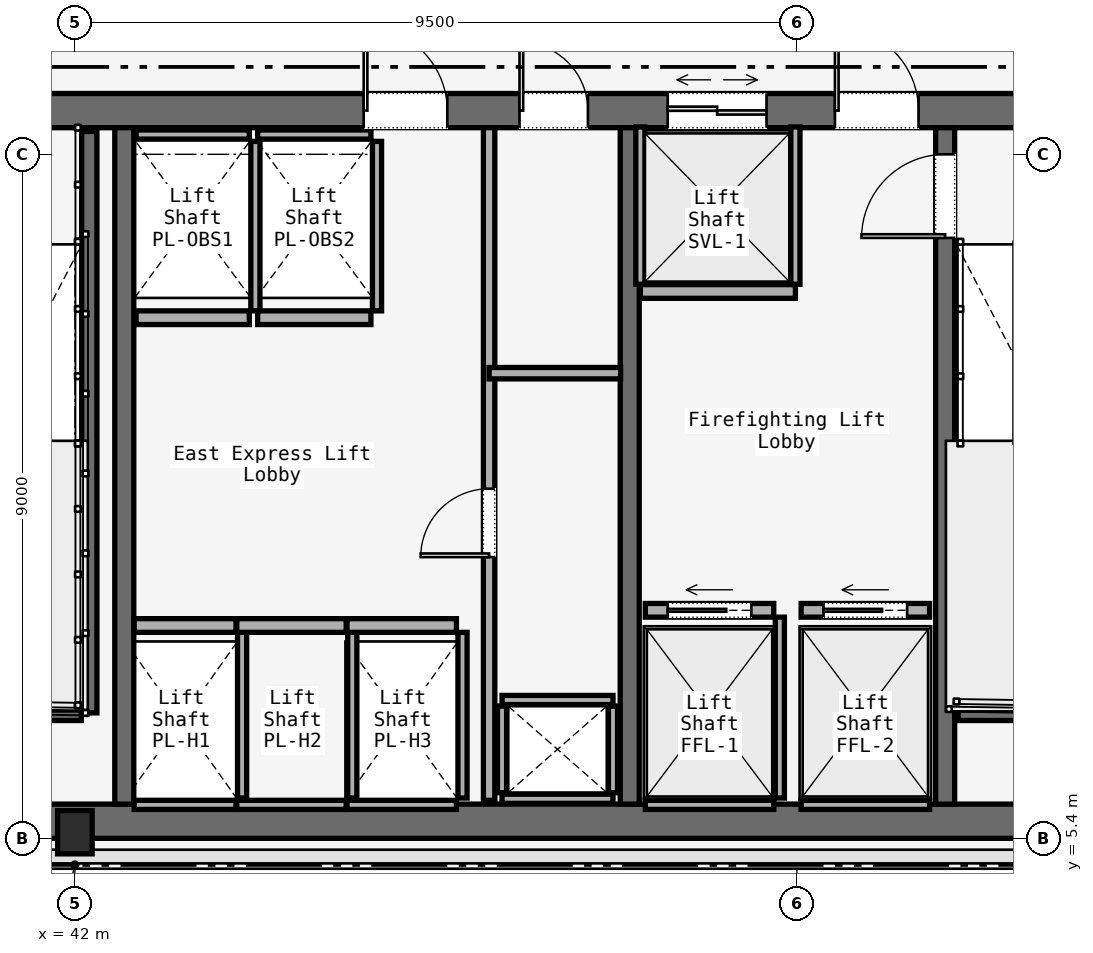
"""IFC4 building model, lengths in metres.
Left out: names, types, materials, properties, quantities, classifications, styles, units other than length and angle.
Written with IfcOpenShell. Run it as: python <this file> out.ifc"""

import sys

from ifc_helpers import new_model, si_unit, direction, frame, frame_2d, origin, origin_2d, place, context, subcontext, project, spatial, rectangle, i_section, extrude, element, fill, save


model = new_model("IFC4")
c1 = context("Model", 3, precision=1e-05, world=origin(), true_north=direction((0.0, 1.0)))
c2 = subcontext(c1, "Body", "Model", "MODEL_VIEW")
j1 = project(units=[si_unit("LENGTHUNIT", "METRE"), si_unit("PLANEANGLEUNIT", "RADIAN")], contexts=[c1])
p1 = place(None, origin())
s1 = spatial("IfcSite", under=j1, at=p1, CompositionType="ELEMENT")
p2 = place(p1, origin())
s2 = spatial("IfcBuilding", under=s1, at=p2, CompositionType="ELEMENT")
p3 = place(p2, frame((0.0, 0.0, 58.8)))
s3 = spatial("IfcBuildingStorey", under=s2, at=p3, CompositionType="ELEMENT", Elevation=58.8)
p4 = place(p3, frame((26.45, 14.975, 0.0), z_axis=(0.0, 0.0, 1.0), x_axis=(1.0, 0.0, 0.0)))
e1 = element("IfcWall", 1, at=p4, inside=s3, PredefinedType="SOLIDWALL", context=c2, shape_type="SweptSolid", body=[
    extrude(rectangle(XDim=31.1, YDim=0.45, at=frame_2d((15.55, 0.0))), origin(), (0.0, 0.0, 1.0), 3.58),
])
p5 = place(p4, frame((1.65, 0.0, 0.0)))
e2 = element("IfcOpeningElement", 2, at=p5, cuts=e1, PredefinedType="OPENING", context=c2, shape_type="SweptSolid", body=[
    extrude(rectangle(XDim=1.1, YDim=2.2, at=frame_2d((0.55, 1.1))), frame((0.0, 0.225, 0.0), z_axis=(0.0, -1.0, 0.0), x_axis=(1.0, 0.0, 0.0)), (0.0, 0.0, 1.0), 0.45),
])
p6 = place(p4, frame((13.65, 0.0, 0.0)))
e3 = element("IfcOpeningElement", 3, at=p6, cuts=e1, PredefinedType="OPENING", context=c2, shape_type="SweptSolid", body=[
    extrude(rectangle(XDim=1.1, YDim=2.2, at=frame_2d((0.55, 1.1))), frame((0.0, 0.225, 0.0), z_axis=(0.0, -1.0, 0.0), x_axis=(1.0, 0.0, 0.0)), (0.0, 0.0, 1.0), 0.45),
])
p7 = place(p4, frame((25.55, 0.0, 0.0)))
e4 = element("IfcOpeningElement", 4, at=p7, cuts=e1, PredefinedType="OPENING", context=c2, shape_type="SweptSolid", body=[
    extrude(rectangle(XDim=1.1, YDim=2.2, at=frame_2d((0.55, 1.1))), frame((0.0, 0.225, 0.0), z_axis=(0.0, -1.0, 0.0), x_axis=(1.0, 0.0, 0.0)), (0.0, 0.0, 1.0), 0.45),
])
p8 = place(p4, frame((10.7, 0.0, 0.0)))
e5 = element("IfcOpeningElement", 5, at=p8, cuts=e1, PredefinedType="OPENING", context=c2, shape_type="SweptSolid", body=[
    extrude(rectangle(XDim=1.4, YDim=2.2, at=frame_2d((0.7, 1.1))), frame((0.0, 0.225, 0.0), z_axis=(0.0, -1.0, 0.0), x_axis=(1.0, 0.0, 0.0)), (0.0, 0.0, 1.0), 0.45),
])
p9 = place(p4, frame((19.35, 0.0, 0.0)))
e6 = element("IfcOpeningElement", 6, at=p9, cuts=e1, PredefinedType="OPENING", context=c2, shape_type="SweptSolid", body=[
    extrude(rectangle(XDim=1.1, YDim=2.2, at=frame_2d((0.55, 1.1))), frame((0.0, 0.225, 0.0), z_axis=(0.0, -1.0, 0.0), x_axis=(1.0, 0.0, 0.0)), (0.0, 0.0, 1.0), 0.45),
])
p10 = place(p4, frame((21.4, 0.0, 0.0)))
e7 = element("IfcOpeningElement", 7, at=p10, cuts=e1, PredefinedType="OPENING", context=c2, shape_type="SweptSolid", body=[
    extrude(rectangle(XDim=0.9, YDim=2.1, at=frame_2d((0.45, 1.05))), frame((0.0, 0.225, 0.0), z_axis=(0.0, -1.0, 0.0), x_axis=(1.0, 0.0, 0.0)), (0.0, 0.0, 1.0), 0.45),
])
p11 = place(p4, frame((23.35, 0.0, 0.0)))
e8 = element("IfcOpeningElement", 8, at=p11, cuts=e1, PredefinedType="OPENING", context=c2, shape_type="SweptSolid", body=[
    extrude(rectangle(XDim=1.3, YDim=2.3, at=frame_2d((0.65, 1.15))), frame((0.0, 0.225, 0.0), z_axis=(0.0, -1.0, 0.0), x_axis=(1.0, 0.0, 0.0)), (0.0, 0.0, 1.0), 0.45),
])
p12 = place(p3, frame((26.45, 5.625, 0.0), z_axis=(0.0, 0.0, 1.0), x_axis=(1.0, 0.0, 0.0)))
e9 = element("IfcWall", 9, at=p12, inside=s3, PredefinedType="SOLIDWALL", context=c2, shape_type="SweptSolid", body=[
    extrude(rectangle(XDim=31.1, YDim=0.45, at=frame_2d((15.55, 0.0))), origin(), (0.0, 0.0, 1.0), 3.58),
])
for number, where, z_axis, x_axis in (
    (10, (42.65, 5.85, 0.0), (0.0, 0.0, 1.0), (0.0, 1.0, 0.0)),
    (11, (49.3, 5.85, 0.0), (0.0, 0.0, 1.0), (0.0, 1.0, 0.0)),
):
    element("IfcWall", number, at=place(p3, frame(where, z_axis=z_axis, x_axis=x_axis)), inside=s3, PredefinedType="SOLIDWALL", context=c2, shape_type="SweptSolid", body=[
        extrude(rectangle(XDim=8.9, YDim=0.25, at=frame_2d((4.45, 0.0))), origin(), (0.0, 0.0, 1.0), 3.58),
    ])
p13 = place(p3, frame((53.45, 5.85, 0.0), z_axis=(0.0, 0.0, 1.0), x_axis=(0.0, 1.0, 0.0)))
e12 = element("IfcWall", 12, at=p13, inside=s3, PredefinedType="SOLIDWALL", context=c2, shape_type="SweptSolid", body=[
    extrude(rectangle(XDim=8.9, YDim=0.25, at=frame_2d((4.45, 0.0))), origin(), (0.0, 0.0, 1.0), 3.58),
])
p14 = place(p13, frame((7.45, 0.0, 0.0)))
e13 = element("IfcOpeningElement", 13, at=p14, cuts=e12, PredefinedType="OPENING", context=c2, shape_type="SweptSolid", body=[
    extrude(rectangle(XDim=1.1, YDim=2.2, at=frame_2d((0.55, 1.1))), frame((0.0, 0.125, 0.0), z_axis=(0.0, -1.0, 0.0), x_axis=(1.0, 0.0, 0.0)), (0.0, 0.0, 1.0), 0.25),
])
p15 = place(p3, frame((42.0, 5.48, 0.0), z_axis=(0.0, 0.0, 1.0), x_axis=(1.0, 0.0, 0.0)))
e14 = element("IfcColumn", 14, at=p15, inside=s3, PredefinedType="COLUMN", context=c2, shape_type="SweptSolid", body=[
    extrude(i_section(OverallWidth=0.454, OverallDepth=0.569, WebThickness=0.078, FlangeThickness=0.08, FilletRadius=0.015, at=origin_2d()), origin(), (0.0, 0.0, 1.0), 3.58),
])
p16 = place(p3, frame((42.19, 14.7, 0.0), z_axis=(0.0, 0.0, 1.0), x_axis=(0.0, -1.0, 0.0)))
e15 = element("IfcWall", 15, at=p16, inside=s3, PredefinedType="SOLIDWALL", context=c2, shape_type="SweptSolid", body=[
    extrude(rectangle(XDim=7.65, YDim=0.2, at=frame_2d((3.825, 0.0))), origin(), (0.0, 0.0, 1.0), 3.8),
])
for number, where, z_axis, x_axis in (
    (16, (38.97, 7.05, 0.0), (0.0, 0.0, 1.0), (1.0, 0.0, 0.0)),
    (17, (53.62, 7.05, 0.0), (0.0, 0.0, 1.0), (1.0, 0.0, 0.0)),
):
    element("IfcWall", number, at=place(p3, frame(where, z_axis=z_axis, x_axis=x_axis)), inside=s3, PredefinedType="SOLIDWALL", context=c2, shape_type="SweptSolid", body=[
        extrude(rectangle(XDim=3.115, YDim=0.2, at=frame_2d((1.558, 0.0))), origin(), (0.0, 0.0, 1.0), 3.8),
    ])
for number, where, z_axis, x_axis in (
    (18, (47.62, 5.92, 0.0), (0.0, 0.0, 1.0), (1.0, 0.0, 0.0)),
    (19, (47.62, 7.22, 0.0), (0.0, 0.0, 1.0), (1.0, 0.0, 0.0)),
):
    element("IfcWall", number, at=place(p3, frame(where, z_axis=z_axis, x_axis=x_axis)), inside=s3, PredefinedType="SOLIDWALL", context=c2, shape_type="SweptSolid", body=[
        extrude(rectangle(XDim=1.46, YDim=0.12, at=frame_2d((0.73, 0.0))), origin(), (0.0, 0.0, 1.0), 2.933),
    ])
for number, where, z_axis, x_axis in (
    (20, (47.62, 6.0, 0.0), (0.0, 0.0, 1.0), (0.0, 1.0, 0.0)),
    (21, (49.08, 6.0, 0.0), (0.0, 0.0, 1.0), (0.0, 1.0, 0.0)),
):
    element("IfcWall", number, at=place(p3, frame(where, z_axis=z_axis, x_axis=x_axis)), inside=s3, PredefinedType="SOLIDWALL", context=c2, shape_type="SweptSolid", body=[
        extrude(rectangle(XDim=1.14, YDim=0.12, at=frame_2d((0.57, 0.0))), origin(), (0.0, 0.0, 1.0), 2.933),
    ])
p17 = place(p3, frame((47.45, 5.9, 0.0), z_axis=(0.0, 0.0, 1.0), x_axis=(0.0, 1.0, 0.0)))
e22 = element("IfcWall", 22, at=p17, inside=s3, PredefinedType="PARTITIONING", context=c2, shape_type="SweptSolid", body=[
    extrude(rectangle(XDim=8.85, YDim=0.15, at=frame_2d((4.425, 0.0))), origin(), (0.0, 0.0, 1.0), 2.933),
])
p18 = place(p17, frame((3.2, 0.0, 0.0)))
e23 = element("IfcOpeningElement", 23, at=p18, cuts=e22, PredefinedType="OPENING", context=c2, shape_type="SweptSolid", body=[
    extrude(rectangle(XDim=0.9, YDim=2.1, at=frame_2d((0.45, 1.05))), frame((0.0, 0.075, 0.0), z_axis=(0.0, -1.0, 0.0), x_axis=(1.0, 0.0, 0.0)), (0.0, 0.0, 1.0), 0.15),
])
p19 = place(p3, frame((47.45, 11.52, 0.0), z_axis=(0.0, 0.0, 1.0), x_axis=(1.0, 0.0, 0.0)))
e24 = element("IfcWall", 24, at=p19, inside=s3, PredefinedType="PARTITIONING", context=c2, shape_type="SweptSolid", body=[
    extrude(rectangle(XDim=1.73, YDim=0.15, at=frame_2d((0.865, 0.0))), origin(), (0.0, 0.0, 1.0), 2.933),
])
p20 = place(p3, frame((42.78, 8.2, 0.0), z_axis=(0.0, 0.0, 1.0), x_axis=(1.0, 0.0, 0.0)))
e25 = element("IfcWall", 25, at=p20, inside=s3, PredefinedType="SOLIDWALL", context=c2, shape_type="SweptSolid", body=[
    extrude(rectangle(XDim=1.34, YDim=0.18, at=frame_2d((0.67, 0.0))), origin(), (0.0, 0.0, 1.0), 2.933),
])
p21 = place(p3, frame((42.78, 5.84, 0.0), z_axis=(0.0, 0.0, 1.0), x_axis=(1.0, 0.0, 0.0)))
e26 = element("IfcWall", 26, at=p21, inside=s3, PredefinedType="SOLIDWALL", context=c2, shape_type="SweptSolid", body=[
    extrude(rectangle(XDim=1.34, YDim=0.12, at=frame_2d((0.67, 0.0))), origin(), (0.0, 0.0, 1.0), 2.933),
])
p22 = place(p3, frame((44.2, 5.93, 0.0), z_axis=(0.0, 0.0, 1.0), x_axis=(0.0, 1.0, 0.0)))
e27 = element("IfcWall", 27, at=p22, inside=s3, PredefinedType="SOLIDWALL", context=c2, shape_type="SweptSolid", body=[
    extrude(rectangle(XDim=2.18, YDim=0.12, at=frame_2d((1.09, 0.0))), origin(), (0.0, 0.0, 1.0), 2.933),
])
p23 = place(p3, frame((44.13, 8.2, 0.0), z_axis=(0.0, 0.0, 1.0), x_axis=(1.0, 0.0, 0.0)))
e28 = element("IfcWall", 28, at=p23, inside=s3, PredefinedType="SOLIDWALL", context=c2, shape_type="SweptSolid", body=[
    extrude(rectangle(XDim=1.44, YDim=0.18, at=frame_2d((0.72, 0.0))), origin(), (0.0, 0.0, 1.0), 2.933),
])
p24 = place(p3, frame((44.13, 5.84, 0.0), z_axis=(0.0, 0.0, 1.0), x_axis=(1.0, 0.0, 0.0)))
e29 = element("IfcWall", 29, at=p24, inside=s3, PredefinedType="SOLIDWALL", context=c2, shape_type="SweptSolid", body=[
    extrude(rectangle(XDim=1.44, YDim=0.12, at=frame_2d((0.72, 0.0))), origin(), (0.0, 0.0, 1.0), 2.933),
])
p25 = place(p3, frame((45.65, 5.93, 0.0), z_axis=(0.0, 0.0, 1.0), x_axis=(0.0, 1.0, 0.0)))
e30 = element("IfcWall", 30, at=p25, inside=s3, PredefinedType="SOLIDWALL", context=c2, shape_type="SweptSolid", body=[
    extrude(rectangle(XDim=2.18, YDim=0.12, at=frame_2d((1.09, 0.0))), origin(), (0.0, 0.0, 1.0), 2.933),
])
p26 = place(p3, frame((45.58, 8.2, 0.0), z_axis=(0.0, 0.0, 1.0), x_axis=(1.0, 0.0, 0.0)))
e31 = element("IfcWall", 31, at=p26, inside=s3, PredefinedType="SOLIDWALL", context=c2, shape_type="SweptSolid", body=[
    extrude(rectangle(XDim=1.44, YDim=0.18, at=frame_2d((0.72, 0.0))), origin(), (0.0, 0.0, 1.0), 2.933),
])
p27 = place(p3, frame((45.58, 5.84, 0.0), z_axis=(0.0, 0.0, 1.0), x_axis=(1.0, 0.0, 0.0)))
e32 = element("IfcWall", 32, at=p27, inside=s3, PredefinedType="SOLIDWALL", context=c2, shape_type="SweptSolid", body=[
    extrude(rectangle(XDim=1.44, YDim=0.12, at=frame_2d((0.72, 0.0))), origin(), (0.0, 0.0, 1.0), 2.933),
])
p28 = place(p3, frame((47.1, 5.93, 0.0), z_axis=(0.0, 0.0, 1.0), x_axis=(0.0, 1.0, 0.0)))
e33 = element("IfcWall", 33, at=p28, inside=s3, PredefinedType="SOLIDWALL", context=c2, shape_type="SweptSolid", body=[
    extrude(rectangle(XDim=2.18, YDim=0.12, at=frame_2d((1.09, 0.0))), origin(), (0.0, 0.0, 1.0), 2.933),
])
p29 = place(p3, frame((42.805, 12.25, 0.0), z_axis=(0.0, 0.0, 1.0), x_axis=(1.0, 0.0, 0.0)))
e34 = element("IfcWall", 34, at=p29, inside=s3, PredefinedType="SOLIDWALL", context=c2, shape_type="SweptSolid", body=[
    extrude(rectangle(XDim=1.49, YDim=0.18, at=frame_2d((0.745, 0.0))), origin(), (0.0, 0.0, 1.0), 2.933),
])
p30 = place(p3, frame((42.805, 14.66, 0.0), z_axis=(0.0, 0.0, 1.0), x_axis=(1.0, 0.0, 0.0)))
e35 = element("IfcWall", 35, at=p30, inside=s3, PredefinedType="SOLIDWALL", context=c2, shape_type="SweptSolid", body=[
    extrude(rectangle(XDim=1.49, YDim=0.12, at=frame_2d((0.745, 0.0))), origin(), (0.0, 0.0, 1.0), 2.933),
])
p31 = place(p3, frame((44.375, 12.34, 0.0), z_axis=(0.0, 0.0, 1.0), x_axis=(0.0, 1.0, 0.0)))
e36 = element("IfcWall", 36, at=p31, inside=s3, PredefinedType="SOLIDWALL", context=c2, shape_type="SweptSolid", body=[
    extrude(rectangle(XDim=2.23, YDim=0.12, at=frame_2d((1.115, 0.0))), origin(), (0.0, 0.0, 1.0), 2.933),
])
p32 = place(p3, frame((44.405, 12.25, 0.0), z_axis=(0.0, 0.0, 1.0), x_axis=(1.0, 0.0, 0.0)))
e37 = element("IfcWall", 37, at=p32, inside=s3, PredefinedType="SOLIDWALL", context=c2, shape_type="SweptSolid", body=[
    extrude(rectangle(XDim=1.49, YDim=0.18, at=frame_2d((0.745, 0.0))), origin(), (0.0, 0.0, 1.0), 2.933),
])
p33 = place(p3, frame((44.405, 14.66, 0.0), z_axis=(0.0, 0.0, 1.0), x_axis=(1.0, 0.0, 0.0)))
e38 = element("IfcWall", 38, at=p33, inside=s3, PredefinedType="SOLIDWALL", context=c2, shape_type="SweptSolid", body=[
    extrude(rectangle(XDim=1.49, YDim=0.12, at=frame_2d((0.745, 0.0))), origin(), (0.0, 0.0, 1.0), 2.933),
])
p34 = place(p3, frame((45.975, 12.34, 0.0), z_axis=(0.0, 0.0, 1.0), x_axis=(0.0, 1.0, 0.0)))
e39 = element("IfcWall", 39, at=p34, inside=s3, PredefinedType="SOLIDWALL", context=c2, shape_type="SweptSolid", body=[
    extrude(rectangle(XDim=2.23, YDim=0.12, at=frame_2d((1.115, 0.0))), origin(), (0.0, 0.0, 1.0), 2.933),
])
p35 = place(p3, frame((49.505, 8.4, 0.0), z_axis=(0.0, 0.0, 1.0), x_axis=(1.0, 0.0, 0.0)))
e40 = element("IfcWall", 40, at=p35, inside=s3, PredefinedType="SOLIDWALL", context=c2, shape_type="SweptSolid", body=[
    extrude(rectangle(XDim=1.69, YDim=0.18, at=frame_2d((0.845, 0.0))), origin(), (0.0, 0.0, 1.0), 2.933),
])
p36 = place(p35, frame((0.295, 0.0, 0.0)))
e41 = element("IfcOpeningElement", 41, at=p36, cuts=e40, PredefinedType="OPENING", context=c2, shape_type="SweptSolid", body=[
    extrude(rectangle(XDim=1.1, YDim=2.2, at=frame_2d((0.55, 1.1))), frame((0.0, 0.09, 0.0), z_axis=(0.0, -1.0, 0.0), x_axis=(1.0, 0.0, 0.0)), (0.0, 0.0, 1.0), 0.18),
])
p37 = place(p3, frame((49.505, 5.84, 0.0), z_axis=(0.0, 0.0, 1.0), x_axis=(1.0, 0.0, 0.0)))
e42 = element("IfcWall", 42, at=p37, inside=s3, PredefinedType="SOLIDWALL", context=c2, shape_type="SweptSolid", body=[
    extrude(rectangle(XDim=1.69, YDim=0.12, at=frame_2d((0.845, 0.0))), origin(), (0.0, 0.0, 1.0), 2.933),
])
p38 = place(p3, frame((51.275, 5.93, 0.0), z_axis=(0.0, 0.0, 1.0), x_axis=(0.0, 1.0, 0.0)))
e43 = element("IfcWall", 43, at=p38, inside=s3, PredefinedType="SOLIDWALL", context=c2, shape_type="SweptSolid", body=[
    extrude(rectangle(XDim=2.38, YDim=0.12, at=frame_2d((1.19, 0.0))), origin(), (0.0, 0.0, 1.0), 2.933),
])
p39 = place(p3, frame((51.555, 8.4, 0.0), z_axis=(0.0, 0.0, 1.0), x_axis=(1.0, 0.0, 0.0)))
e44 = element("IfcWall", 44, at=p39, inside=s3, PredefinedType="SOLIDWALL", context=c2, shape_type="SweptSolid", body=[
    extrude(rectangle(XDim=1.69, YDim=0.18, at=frame_2d((0.845, 0.0))), origin(), (0.0, 0.0, 1.0), 2.933),
])
p40 = place(p39, frame((0.295, 0.0, 0.0)))
e45 = element("IfcOpeningElement", 45, at=p40, cuts=e44, PredefinedType="OPENING", context=c2, shape_type="SweptSolid", body=[
    extrude(rectangle(XDim=1.1, YDim=2.2, at=frame_2d((0.55, 1.1))), frame((0.0, 0.09, 0.0), z_axis=(0.0, -1.0, 0.0), x_axis=(1.0, 0.0, 0.0)), (0.0, 0.0, 1.0), 0.18),
])
p41 = place(p3, frame((51.555, 5.84, 0.0), z_axis=(0.0, 0.0, 1.0), x_axis=(1.0, 0.0, 0.0)))
e46 = element("IfcWall", 46, at=p41, inside=s3, PredefinedType="SOLIDWALL", context=c2, shape_type="SweptSolid", body=[
    extrude(rectangle(XDim=1.69, YDim=0.12, at=frame_2d((0.845, 0.0))), origin(), (0.0, 0.0, 1.0), 2.933),
])
p42 = place(p3, frame((49.44, 12.595, 0.0), z_axis=(0.0, 0.0, 1.0), x_axis=(1.0, 0.0, 0.0)))
e47 = element("IfcWall", 47, at=p42, inside=s3, PredefinedType="SOLIDWALL", context=c2, shape_type="SweptSolid", body=[
    extrude(rectangle(XDim=2.04, YDim=0.18, at=frame_2d((1.02, 0.0))), origin(), (0.0, 0.0, 1.0), 2.933),
])
for number, where, z_axis, x_axis in (
    (48, (49.44, 12.69, 0.0), (0.0, 0.0, 1.0), (0.0, 1.0, 0.0)),
    (49, (51.48, 12.69, 0.0), (0.0, 0.0, 1.0), (0.0, 1.0, 0.0)),
):
    element("IfcWall", number, at=place(p3, frame(where, z_axis=z_axis, x_axis=x_axis)), inside=s3, PredefinedType="SOLIDWALL", context=c2, shape_type="SweptSolid", body=[
        extrude(rectangle(XDim=2.07, YDim=0.12, at=frame_2d((1.035, 0.0))), origin(), (0.0, 0.0, 1.0), 2.933),
    ])
p43 = place(p7, origin())
e50 = element("IfcDoor", 50, at=p43, inside=s3, OperationType="SINGLE_SWING_RIGHT", PredefinedType="DOOR", context=c2, shape_type="SweptSolid", body=[
    extrude(rectangle(XDim=1.1, YDim=2.2, at=frame_2d((0.55, 1.1))), frame((0.0, 0.025, 0.0), z_axis=(0.0, -1.0, 0.0), x_axis=(1.0, 0.0, 0.0)), (0.0, 0.0, 1.0), 0.05),
])
fill(e4, e50)
p44 = place(p9, origin())
e51 = element("IfcDoor", 51, at=p44, inside=s3, OperationType="SINGLE_SWING_LEFT", PredefinedType="DOOR", context=c2, shape_type="SweptSolid", body=[
    extrude(rectangle(XDim=1.1, YDim=2.2, at=frame_2d((0.55, 1.1))), frame((0.0, 0.025, 0.0), z_axis=(0.0, -1.0, 0.0), x_axis=(1.0, 0.0, 0.0)), (0.0, 0.0, 1.0), 0.05),
])
fill(e6, e51)
p45 = place(p10, origin())
e52 = element("IfcDoor", 52, at=p45, inside=s3, OperationType="SINGLE_SWING_LEFT", PredefinedType="DOOR", context=c2, shape_type="SweptSolid", body=[
    extrude(rectangle(XDim=0.9, YDim=2.1, at=frame_2d((0.45, 1.05))), frame((0.0, 0.025, 0.0), z_axis=(0.0, -1.0, 0.0), x_axis=(1.0, 0.0, 0.0)), (0.0, 0.0, 1.0), 0.05),
])
fill(e7, e52)
p46 = place(p14, origin())
e53 = element("IfcDoor", 53, at=p46, inside=s3, OperationType="SINGLE_SWING_LEFT", PredefinedType="DOOR", context=c2, shape_type="SweptSolid", body=[
    extrude(rectangle(XDim=1.1, YDim=2.2, at=frame_2d((0.55, 1.1))), frame((0.0, 0.025, 0.0), z_axis=(0.0, -1.0, 0.0), x_axis=(1.0, 0.0, 0.0)), (0.0, 0.0, 1.0), 0.05),
])
fill(e13, e53)
p47 = place(p18, origin())
e54 = element("IfcDoor", 54, at=p47, inside=s3, OperationType="SINGLE_SWING_LEFT", PredefinedType="DOOR", context=c2, shape_type="SweptSolid", body=[
    extrude(rectangle(XDim=0.9, YDim=2.1, at=frame_2d((0.45, 1.05))), frame((0.0, 0.025, 0.0), z_axis=(0.0, -1.0, 0.0), x_axis=(1.0, 0.0, 0.0)), (0.0, 0.0, 1.0), 0.05),
])
fill(e23, e54)
p48 = place(p36, origin())
e55 = element("IfcDoor", 55, at=p48, inside=s3, OperationType="SLIDING_TO_LEFT", PredefinedType="DOOR", context=c2, shape_type="SweptSolid", body=[
    extrude(rectangle(XDim=1.1, YDim=2.2, at=frame_2d((0.55, 1.1))), frame((0.0, 0.025, 0.0), z_axis=(0.0, -1.0, 0.0), x_axis=(1.0, 0.0, 0.0)), (0.0, 0.0, 1.0), 0.05),
])
fill(e41, e55)
p49 = place(p40, origin())
e56 = element("IfcDoor", 56, at=p49, inside=s3, OperationType="SLIDING_TO_LEFT", PredefinedType="DOOR", context=c2, shape_type="SweptSolid", body=[
    extrude(rectangle(XDim=1.1, YDim=2.2, at=frame_2d((0.55, 1.1))), frame((0.0, 0.025, 0.0), z_axis=(0.0, -1.0, 0.0), x_axis=(1.0, 0.0, 0.0)), (0.0, 0.0, 1.0), 0.05),
])
fill(e45, e56)
p50 = place(p11, origin())
e57 = element("IfcDoor", 57, at=p50, inside=s3, OperationType="DOUBLE_DOOR_SLIDING", PredefinedType="DOOR", context=c2, shape_type="SweptSolid", body=[
    extrude(rectangle(XDim=1.3, YDim=2.3, at=frame_2d((0.65, 1.15))), frame((0.0, 0.025, 0.0), z_axis=(0.0, -1.0, 0.0), x_axis=(1.0, 0.0, 0.0)), (0.0, 0.0, 1.0), 0.05),
])
fill(e8, e57)
save(model, sys.argv[1])
